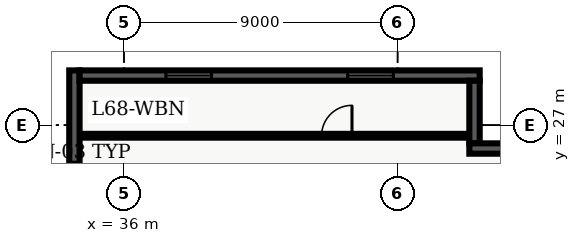
"""IFC4 building model, lengths in metres.
Left out: names, types, materials, properties, quantities, classifications, styles, units other than length and angle.
Written with IfcOpenShell. Run it as: python <this file> out.ifc"""

import sys

from ifc_helpers import new_model, entity, si_unit, converted_unit, direction, frame, origin_with_axes, origin_2d_with_axis, place, context, subcontext, project, spatial, polyline, rectangle, outline, extrude, element, fill, save


model = new_model("IFC4")
c1 = context("Model", 3, precision=1e-05, world=origin_with_axes(), true_north=direction((0.0, 1.0)))
c2 = subcontext(c1, "Body", "Model", "MODEL_VIEW")
j1 = project(units=[si_unit("LENGTHUNIT", "METRE"), converted_unit("PLANEANGLEUNIT", "DEGREE", entity("IfcPlaneAngleMeasure", 0.017), si_unit("PLANEANGLEUNIT", "RADIAN"), dimensions=[0, 0, 0, 0, 0, 0, 0])], contexts=[c1])
p1 = place(None, origin_with_axes())
s1 = spatial("IfcSite", under=j1, at=p1, CompositionType="ELEMENT")
p2 = place(p1, origin_with_axes())
s2 = spatial("IfcBuilding", under=s1, at=p2, CompositionType="ELEMENT")
p3 = place(p2, frame((0.0, 0.0, 276.3), z_axis=(0.0, 0.0, 1.0), x_axis=(1.0, 0.0, 0.0)))
s3 = spatial("IfcBuildingStorey", under=s2, at=p3, CompositionType="ELEMENT", Elevation=276.3)
p4 = place(p3, frame((34.535, 26.65, 0.0), z_axis=(0.0, 0.0, 1.0), x_axis=(1.0, 0.0, 0.0)))
e1 = element("IfcWall", 1, at=p4, inside=s3, PredefinedType="PARTITIONING", context=c2, shape_type="SweptSolid", body=[
    extrude(outline(polyline([(0.0, -0.062), (12.995, -0.062), (12.995, 0.062), (0.0, 0.062), (0.0, -0.062)])), origin_with_axes(), (0.0, 0.0, 1.0), 2.7),
])
p5 = place(p4, frame((8.465, 0.0, 0.0), z_axis=(0.0, 0.0, 1.0), x_axis=(1.0, 0.0, 0.0)))
e2 = element("IfcOpeningElement", 2, at=p5, cuts=e1, PredefinedType="OPENING", context=c2, shape_type="SweptSolid", body=[
    extrude(rectangle(XDim=1.0, YDim=0.145, at=origin_2d_with_axis()), origin_with_axes(), (0.0, 0.0, 1.0), 2.15),
])
p6 = place(p3, frame((34.37, 21.26, 0.0), z_axis=(0.0, 0.0, 1.0), x_axis=(0.0, 1.0, 0.0)))
e3 = element("IfcWall", 3, at=p6, inside=s3, PredefinedType="SOLIDWALL", context=c2, shape_type="SweptSolid", body=[
    extrude(outline(polyline([(0.0, -0.17), (7.54, -0.17), (7.54, 0.17), (0.0, 0.17), (0.0, -0.17)])), origin_with_axes(), (0.0, 0.0, 1.0), 3.66),
])
p7 = place(p6, frame((3.77, 0.0, 0.45), z_axis=(0.0, 0.0, 1.0), x_axis=(1.0, 0.0, 0.0)))
e4 = element("IfcOpeningElement", 4, at=p7, cuts=e3, PredefinedType="OPENING", context=c2, shape_type="SweptSolid", body=[
    extrude(rectangle(XDim=1.5, YDim=0.36, at=origin_2d_with_axis()), origin_with_axes(), (0.0, 0.0, 1.0), 2.1),
])
p8 = place(p3, frame((34.54, 28.63, 0.0), z_axis=(0.0, 0.0, 1.0), x_axis=(1.0, 0.0, 0.0)))
e5 = element("IfcWall", 5, at=p8, inside=s3, PredefinedType="SOLIDWALL", context=c2, shape_type="SweptSolid", body=[
    extrude(outline(polyline([(0.0, -0.17), (13.16, -0.17), (13.16, 0.17), (0.0, 0.17), (0.0, -0.17)])), origin_with_axes(), (0.0, 0.0, 1.0), 3.66),
])
p9 = place(p8, frame((3.59, 0.0, 0.45), z_axis=(0.0, 0.0, 1.0), x_axis=(1.0, 0.0, 0.0)))
e6 = element("IfcOpeningElement", 6, at=p9, cuts=e5, PredefinedType="OPENING", context=c2, shape_type="SweptSolid", body=[
    extrude(rectangle(XDim=1.5, YDim=0.36, at=origin_2d_with_axis()), origin_with_axes(), (0.0, 0.0, 1.0), 2.1),
])
p10 = place(p8, frame((9.57, 0.0, 0.45), z_axis=(0.0, 0.0, 1.0), x_axis=(1.0, 0.0, 0.0)))
e7 = element("IfcOpeningElement", 7, at=p10, cuts=e5, PredefinedType="OPENING", context=c2, shape_type="SweptSolid", body=[
    extrude(rectangle(XDim=1.5, YDim=0.36, at=origin_2d_with_axis()), origin_with_axes(), (0.0, 0.0, 1.0), 2.1),
])
p11 = place(p3, frame((47.53, 28.46, 0.0), z_axis=(0.0, 0.0, 1.0), x_axis=(0.0, -1.0, 0.0)))
e8 = element("IfcWall", 8, at=p11, inside=s3, PredefinedType="SOLIDWALL", context=c2, shape_type="SweptSolid", body=[
    extrude(outline(polyline([(0.0, -0.17), (2.06, -0.17), (2.06, 0.17), (0.0, 0.17), (0.0, -0.17)])), origin_with_axes(), (0.0, 0.0, 1.0), 3.66),
])
p12 = place(p3, frame((47.36, 26.23, 0.0), z_axis=(0.0, 0.0, 1.0), x_axis=(1.0, 0.0, 0.0)))
e9 = element("IfcWall", 9, at=p12, inside=s3, PredefinedType="SOLIDWALL", context=c2, shape_type="SweptSolid", body=[
    extrude(outline(polyline([(0.0, -0.17), (2.74, -0.17), (2.74, 0.17), (0.0, 0.17), (0.0, -0.17)])), origin_with_axes(), (0.0, 0.0, 1.0), 3.66),
])
p13 = place(p4, frame((8.465, 0.0, 0.0), z_axis=(0.0, 0.0, 1.0), x_axis=(1.0, 0.0, 0.0)))
e10 = element("IfcDoor", 10, at=p13, inside=s3, OperationType="SINGLE_SWING_RIGHT", PredefinedType="DOOR", context=c2, shape_type="SweptSolid", body=[
    extrude(rectangle(XDim=1.0, YDim=0.075, at=origin_2d_with_axis()), origin_with_axes(), (0.0, 0.0, 1.0), 2.15),
])
fill(e2, e10)
p14 = place(p8, frame((3.59, 0.0, 0.45), z_axis=(0.0, 0.0, 1.0), x_axis=(1.0, 0.0, 0.0)))
e11 = element("IfcWindow", 11, at=p14, inside=s3, PredefinedType="WINDOW", context=c2, shape_type="SweptSolid", body=[
    extrude(rectangle(XDim=1.5, YDim=0.09, at=origin_2d_with_axis()), origin_with_axes(), (0.0, 0.0, 1.0), 2.1),
])
fill(e6, e11)
p15 = place(p8, frame((9.57, 0.0, 0.45), z_axis=(0.0, 0.0, 1.0), x_axis=(1.0, 0.0, 0.0)))
e12 = element("IfcWindow", 12, at=p15, inside=s3, PredefinedType="WINDOW", context=c2, shape_type="SweptSolid", body=[
    extrude(rectangle(XDim=1.5, YDim=0.09, at=origin_2d_with_axis()), origin_with_axes(), (0.0, 0.0, 1.0), 2.1),
])
fill(e7, e12)
save(model, sys.argv[1])
